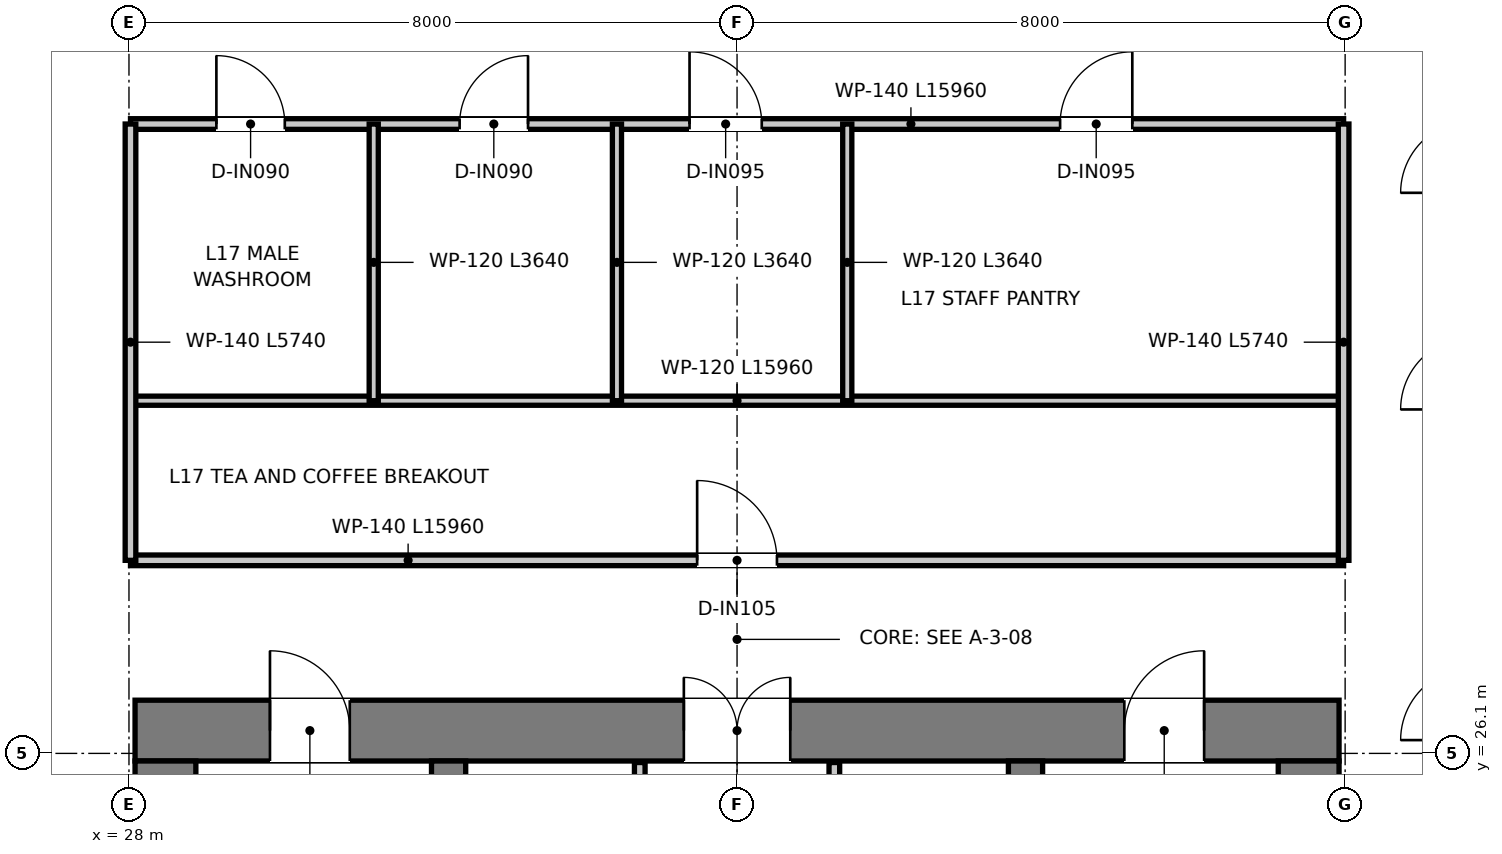
"""IFC4 building model, lengths in metres.
Left out: names, types, materials, properties, quantities, classifications, styles, units other than length and angle.
Written with IfcOpenShell. Run it as: python <this file> out.ifc"""

import sys

from ifc_helpers import new_model, si_unit, direction, frame, frame_2d, origin, place, context, subcontext, project, spatial, rectangle, extrude, element, fill, save


model = new_model("IFC4")
c1 = context("Model", 3, precision=1e-05, world=origin(), true_north=direction((0.0, 1.0)))
c2 = subcontext(c1, "Body", "Model", "MODEL_VIEW")
j1 = project(units=[si_unit("LENGTHUNIT", "METRE"), si_unit("PLANEANGLEUNIT", "RADIAN")], contexts=[c1])
p1 = place(None, origin())
s1 = spatial("IfcSite", under=j1, at=p1, CompositionType="ELEMENT")
p2 = place(p1, origin())
s2 = spatial("IfcBuilding", under=s1, at=p2, CompositionType="ELEMENT")
p3 = place(p2, frame((0.0, 0.0, 72.4)))
s3 = spatial("IfcBuildingStorey", under=s2, at=p3, CompositionType="ELEMENT", Elevation=72.4)
p4 = place(p3, frame((28.08, 26.4, 0.0), z_axis=(0.0, 0.0, 1.0), x_axis=(1.0, 0.0, 0.0)))
e1 = element("IfcWall", 1, at=p4, inside=s3, PredefinedType="SHEAR", context=c2, shape_type="SweptSolid", body=[
    extrude(rectangle(XDim=15.84, YDim=0.8, at=frame_2d((7.92, 0.0))), origin(), (0.0, 0.0, 1.0), 3.95),
])
p5 = place(p4, frame((7.22, 0.0, 0.0)))
e2 = element("IfcOpeningElement", 2, at=p5, cuts=e1, PredefinedType="OPENING", context=c2, shape_type="SweptSolid", body=[
    extrude(rectangle(XDim=1.4, YDim=2.2, at=frame_2d((0.7, 1.1))), frame((0.0, 0.41, 0.0), z_axis=(0.0, -1.0, 0.0), x_axis=(1.0, 0.0, 0.0)), (0.0, 0.0, 1.0), 0.82),
])
p6 = place(p4, frame((1.775, 0.0, 0.0)))
e3 = element("IfcOpeningElement", 3, at=p6, cuts=e1, PredefinedType="OPENING", context=c2, shape_type="SweptSolid", body=[
    extrude(rectangle(XDim=1.05, YDim=2.1, at=frame_2d((0.525, 1.05))), frame((0.0, 0.41, 0.0), z_axis=(0.0, -1.0, 0.0), x_axis=(1.0, 0.0, 0.0)), (0.0, 0.0, 1.0), 0.82),
])
p7 = place(p4, frame((13.015, 0.0, 0.0)))
e4 = element("IfcOpeningElement", 4, at=p7, cuts=e1, PredefinedType="OPENING", context=c2, shape_type="SweptSolid", body=[
    extrude(rectangle(XDim=1.05, YDim=2.1, at=frame_2d((0.525, 1.05))), frame((0.0, 0.41, 0.0), z_axis=(0.0, -1.0, 0.0), x_axis=(1.0, 0.0, 0.0)), (0.0, 0.0, 1.0), 0.82),
])
for number, where, z_axis, x_axis in (
    (5, (28.48, 11.3, 0.0), (0.0, 0.0, 1.0), (0.0, 1.0, 0.0)),
    (6, (43.52, 11.3, 0.0), (0.0, 0.0, 1.0), (0.0, 1.0, 0.0)),
):
    element("IfcWall", number, at=place(p3, frame(where, z_axis=z_axis, x_axis=x_axis)), inside=s3, PredefinedType="SHEAR", context=c2, shape_type="SweptSolid", body=[
        extrude(rectangle(XDim=14.7, YDim=0.8, at=frame_2d((7.35, 0.0))), origin(), (0.0, 0.0, 1.0), 3.95),
    ])
p8 = place(p3, frame((32.205, 13.22, 0.0), z_axis=(0.0, 0.0, 1.0), x_axis=(0.0, 1.0, 0.0)))
e7 = element("IfcWall", 7, at=p8, inside=s3, PredefinedType="SHEAR", context=c2, shape_type="SweptSolid", body=[
    extrude(rectangle(XDim=12.78, YDim=0.45, at=frame_2d((6.39, 0.0))), origin(), (0.0, 0.0, 1.0), 3.95),
])
p9 = place(p8, frame((10.58, 0.0, 0.0)))
e8 = element("IfcOpeningElement", 8, at=p9, cuts=e7, PredefinedType="OPENING", context=c2, shape_type="SweptSolid", body=[
    extrude(rectangle(XDim=1.1, YDim=2.15, at=frame_2d((0.55, 1.075))), frame((0.0, 0.235, 0.0), z_axis=(0.0, -1.0, 0.0), x_axis=(1.0, 0.0, 0.0)), (0.0, 0.0, 1.0), 0.47),
])
p10 = place(p3, frame((39.795, 13.22, 0.0), z_axis=(0.0, 0.0, 1.0), x_axis=(0.0, 1.0, 0.0)))
e9 = element("IfcWall", 9, at=p10, inside=s3, PredefinedType="SHEAR", context=c2, shape_type="SweptSolid", body=[
    extrude(rectangle(XDim=12.78, YDim=0.45, at=frame_2d((6.39, 0.0))), origin(), (0.0, 0.0, 1.0), 3.95),
])
p11 = place(p10, frame((10.58, 0.0, 0.0)))
e10 = element("IfcOpeningElement", 10, at=p11, cuts=e9, PredefinedType="OPENING", context=c2, shape_type="SweptSolid", body=[
    extrude(rectangle(XDim=1.1, YDim=2.15, at=frame_2d((0.55, 1.075))), frame((0.0, 0.235, 0.0), z_axis=(0.0, -1.0, 0.0), x_axis=(1.0, 0.0, 0.0)), (0.0, 0.0, 1.0), 0.47),
])
p12 = place(p3, frame((34.72, 20.2, 0.0), z_axis=(0.0, 0.0, 1.0), x_axis=(0.0, 1.0, 0.0)))
e11 = element("IfcWall", 11, at=p12, inside=s3, PredefinedType="PARTITIONING", context=c2, shape_type="SweptSolid", body=[
    extrude(rectangle(XDim=5.78, YDim=0.14, at=frame_2d((2.89, 0.0))), origin(), (0.0, 0.0, 1.0), 2.47),
])
p13 = place(p12, frame((1.05, 0.0, 0.0)))
e12 = element("IfcOpeningElement", 12, at=p13, cuts=e11, PredefinedType="OPENING", context=c2, shape_type="SweptSolid", body=[
    extrude(rectangle(XDim=0.9, YDim=2.1, at=frame_2d((0.45, 1.05))), frame((0.0, 0.08, 0.0), z_axis=(0.0, -1.0, 0.0), x_axis=(1.0, 0.0, 0.0)), (0.0, 0.0, 1.0), 0.16),
])
p14 = place(p3, frame((37.28, 20.2, 0.0), z_axis=(0.0, 0.0, 1.0), x_axis=(0.0, 1.0, 0.0)))
e13 = element("IfcWall", 13, at=p14, inside=s3, PredefinedType="PARTITIONING", context=c2, shape_type="SweptSolid", body=[
    extrude(rectangle(XDim=5.78, YDim=0.14, at=frame_2d((2.89, 0.0))), origin(), (0.0, 0.0, 1.0), 2.47),
])
p15 = place(p14, frame((0.95, 0.0, 0.0)))
e14 = element("IfcOpeningElement", 14, at=p15, cuts=e13, PredefinedType="OPENING", context=c2, shape_type="SweptSolid", body=[
    extrude(rectangle(XDim=1.1, YDim=2.15, at=frame_2d((0.55, 1.075))), frame((0.0, 0.08, 0.0), z_axis=(0.0, -1.0, 0.0), x_axis=(1.0, 0.0, 0.0)), (0.0, 0.0, 1.0), 0.16),
])
p16 = place(p3, frame((28.02, 28.64, 0.0), z_axis=(0.0, 0.0, 1.0), x_axis=(1.0, 0.0, 0.0)))
e15 = element("IfcWall", 15, at=p16, inside=s3, PredefinedType="PARTITIONING", context=c2, shape_type="SweptSolid", body=[
    extrude(rectangle(XDim=15.96, YDim=0.14, at=frame_2d((7.98, 0.0))), origin(), (0.0, 0.0, 1.0), 3.08),
])
p17 = place(p16, frame((7.455, 0.0, 0.0)))
e16 = element("IfcOpeningElement", 16, at=p17, cuts=e15, PredefinedType="OPENING", context=c2, shape_type="SweptSolid", body=[
    extrude(rectangle(XDim=1.05, YDim=2.15, at=frame_2d((0.525, 1.075))), frame((0.0, 0.08, 0.0), z_axis=(0.0, -1.0, 0.0), x_axis=(1.0, 0.0, 0.0)), (0.0, 0.0, 1.0), 0.16),
])
p18 = place(p3, frame((28.02, 30.74, 0.0), z_axis=(0.0, 0.0, 1.0), x_axis=(1.0, 0.0, 0.0)))
e17 = element("IfcWall", 17, at=p18, inside=s3, PredefinedType="PARTITIONING", context=c2, shape_type="SweptSolid", body=[
    extrude(rectangle(XDim=15.96, YDim=0.12, at=frame_2d((7.98, 0.0))), origin(), (0.0, 0.0, 1.0), 3.08),
])
p19 = place(p3, frame((28.02, 34.38, 0.0), z_axis=(0.0, 0.0, 1.0), x_axis=(1.0, 0.0, 0.0)))
e18 = element("IfcWall", 18, at=p19, inside=s3, PredefinedType="PARTITIONING", context=c2, shape_type="SweptSolid", body=[
    extrude(rectangle(XDim=15.96, YDim=0.14, at=frame_2d((7.98, 0.0))), origin(), (0.0, 0.0, 1.0), 3.08),
])
p20 = place(p19, frame((1.13, 0.0, 0.0)))
e19 = element("IfcOpeningElement", 19, at=p20, cuts=e18, PredefinedType="OPENING", context=c2, shape_type="SweptSolid", body=[
    extrude(rectangle(XDim=0.9, YDim=2.1, at=frame_2d((0.45, 1.05))), frame((0.0, 0.08, 0.0), z_axis=(0.0, -1.0, 0.0), x_axis=(1.0, 0.0, 0.0)), (0.0, 0.0, 1.0), 0.16),
])
p21 = place(p19, frame((4.33, 0.0, 0.0)))
e20 = element("IfcOpeningElement", 20, at=p21, cuts=e18, PredefinedType="OPENING", context=c2, shape_type="SweptSolid", body=[
    extrude(rectangle(XDim=0.9, YDim=2.1, at=frame_2d((0.45, 1.05))), frame((0.0, 0.08, 0.0), z_axis=(0.0, -1.0, 0.0), x_axis=(1.0, 0.0, 0.0)), (0.0, 0.0, 1.0), 0.16),
])
p22 = place(p19, frame((7.355, 0.0, 0.0)))
e21 = element("IfcOpeningElement", 21, at=p22, cuts=e18, PredefinedType="OPENING", context=c2, shape_type="SweptSolid", body=[
    extrude(rectangle(XDim=0.95, YDim=2.1, at=frame_2d((0.475, 1.05))), frame((0.0, 0.08, 0.0), z_axis=(0.0, -1.0, 0.0), x_axis=(1.0, 0.0, 0.0)), (0.0, 0.0, 1.0), 0.16),
])
p23 = place(p19, frame((12.23, 0.0, 0.0)))
e22 = element("IfcOpeningElement", 22, at=p23, cuts=e18, PredefinedType="OPENING", context=c2, shape_type="SweptSolid", body=[
    extrude(rectangle(XDim=0.95, YDim=2.1, at=frame_2d((0.475, 1.05))), frame((0.0, 0.08, 0.0), z_axis=(0.0, -1.0, 0.0), x_axis=(1.0, 0.0, 0.0)), (0.0, 0.0, 1.0), 0.16),
])
for number, where, z_axis, x_axis in (
    (23, (28.02, 28.64, 0.0), (0.0, 0.0, 1.0), (0.0, 1.0, 0.0)),
    (24, (43.98, 28.64, 0.0), (0.0, 0.0, 1.0), (0.0, 1.0, 0.0)),
):
    element("IfcWall", number, at=place(p3, frame(where, z_axis=z_axis, x_axis=x_axis)), inside=s3, PredefinedType="PARTITIONING", context=c2, shape_type="SweptSolid", body=[
        extrude(rectangle(XDim=5.74, YDim=0.14, at=frame_2d((2.87, 0.0))), origin(), (0.0, 0.0, 1.0), 3.22),
    ])
for number, where, z_axis, x_axis in (
    (25, (31.22, 30.74, 0.0), (0.0, 0.0, 1.0), (0.0, 1.0, 0.0)),
    (26, (34.42, 30.74, 0.0), (0.0, 0.0, 1.0), (0.0, 1.0, 0.0)),
    (27, (37.45, 30.74, 0.0), (0.0, 0.0, 1.0), (0.0, 1.0, 0.0)),
):
    element("IfcWall", number, at=place(p3, frame(where, z_axis=z_axis, x_axis=x_axis)), inside=s3, PredefinedType="PARTITIONING", context=c2, shape_type="SweptSolid", body=[
        extrude(rectangle(XDim=3.64, YDim=0.12, at=frame_2d((1.82, 0.0))), origin(), (0.0, 0.0, 1.0), 3.12),
    ])
p24 = place(p5, origin())
e28 = element("IfcDoor", 28, at=p24, inside=s3, OperationType="DOUBLE_DOOR_SINGLE_SWING", PredefinedType="DOOR", context=c2, shape_type="SweptSolid", body=[
    extrude(rectangle(XDim=1.4, YDim=2.2, at=frame_2d((0.7, 1.1))), frame((0.0, 0.025, 0.0), z_axis=(0.0, -1.0, 0.0), x_axis=(1.0, 0.0, 0.0)), (0.0, 0.0, 1.0), 0.05),
])
fill(e2, e28)
p25 = place(p6, origin())
e29 = element("IfcDoor", 29, at=p25, inside=s3, OperationType="SINGLE_SWING_LEFT", PredefinedType="DOOR", context=c2, shape_type="SweptSolid", body=[
    extrude(rectangle(XDim=1.05, YDim=2.1, at=frame_2d((0.525, 1.05))), frame((0.0, 0.025, 0.0), z_axis=(0.0, -1.0, 0.0), x_axis=(1.0, 0.0, 0.0)), (0.0, 0.0, 1.0), 0.05),
])
fill(e3, e29)
p26 = place(p7, origin())
e30 = element("IfcDoor", 30, at=p26, inside=s3, OperationType="SINGLE_SWING_RIGHT", PredefinedType="DOOR", context=c2, shape_type="SweptSolid", body=[
    extrude(rectangle(XDim=1.05, YDim=2.1, at=frame_2d((0.525, 1.05))), frame((0.0, 0.025, 0.0), z_axis=(0.0, -1.0, 0.0), x_axis=(1.0, 0.0, 0.0)), (0.0, 0.0, 1.0), 0.05),
])
fill(e4, e30)
p27 = place(p17, origin())
e31 = element("IfcDoor", 31, at=p27, inside=s3, OperationType="SINGLE_SWING_LEFT", PredefinedType="DOOR", context=c2, shape_type="SweptSolid", body=[
    extrude(rectangle(XDim=1.05, YDim=2.15, at=frame_2d((0.525, 1.075))), frame((0.0, 0.025, 0.0), z_axis=(0.0, -1.0, 0.0), x_axis=(1.0, 0.0, 0.0)), (0.0, 0.0, 1.0), 0.05),
])
fill(e16, e31)
p28 = place(p20, origin())
e32 = element("IfcDoor", 32, at=p28, inside=s3, OperationType="SINGLE_SWING_LEFT", PredefinedType="DOOR", context=c2, shape_type="SweptSolid", body=[
    extrude(rectangle(XDim=0.9, YDim=2.1, at=frame_2d((0.45, 1.05))), frame((0.0, 0.025, 0.0), z_axis=(0.0, -1.0, 0.0), x_axis=(1.0, 0.0, 0.0)), (0.0, 0.0, 1.0), 0.05),
])
fill(e19, e32)
p29 = place(p21, origin())
e33 = element("IfcDoor", 33, at=p29, inside=s3, OperationType="SINGLE_SWING_RIGHT", PredefinedType="DOOR", context=c2, shape_type="SweptSolid", body=[
    extrude(rectangle(XDim=0.9, YDim=2.1, at=frame_2d((0.45, 1.05))), frame((0.0, 0.025, 0.0), z_axis=(0.0, -1.0, 0.0), x_axis=(1.0, 0.0, 0.0)), (0.0, 0.0, 1.0), 0.05),
])
fill(e20, e33)
p30 = place(p22, origin())
e34 = element("IfcDoor", 34, at=p30, inside=s3, OperationType="SINGLE_SWING_LEFT", PredefinedType="DOOR", context=c2, shape_type="SweptSolid", body=[
    extrude(rectangle(XDim=0.95, YDim=2.1, at=frame_2d((0.475, 1.05))), frame((0.0, 0.025, 0.0), z_axis=(0.0, -1.0, 0.0), x_axis=(1.0, 0.0, 0.0)), (0.0, 0.0, 1.0), 0.05),
])
fill(e21, e34)
p31 = place(p23, origin())
e35 = element("IfcDoor", 35, at=p31, inside=s3, OperationType="SINGLE_SWING_RIGHT", PredefinedType="DOOR", context=c2, shape_type="SweptSolid", body=[
    extrude(rectangle(XDim=0.95, YDim=2.1, at=frame_2d((0.475, 1.05))), frame((0.0, 0.025, 0.0), z_axis=(0.0, -1.0, 0.0), x_axis=(1.0, 0.0, 0.0)), (0.0, 0.0, 1.0), 0.05),
])
fill(e22, e35)
save(model, sys.argv[1])
